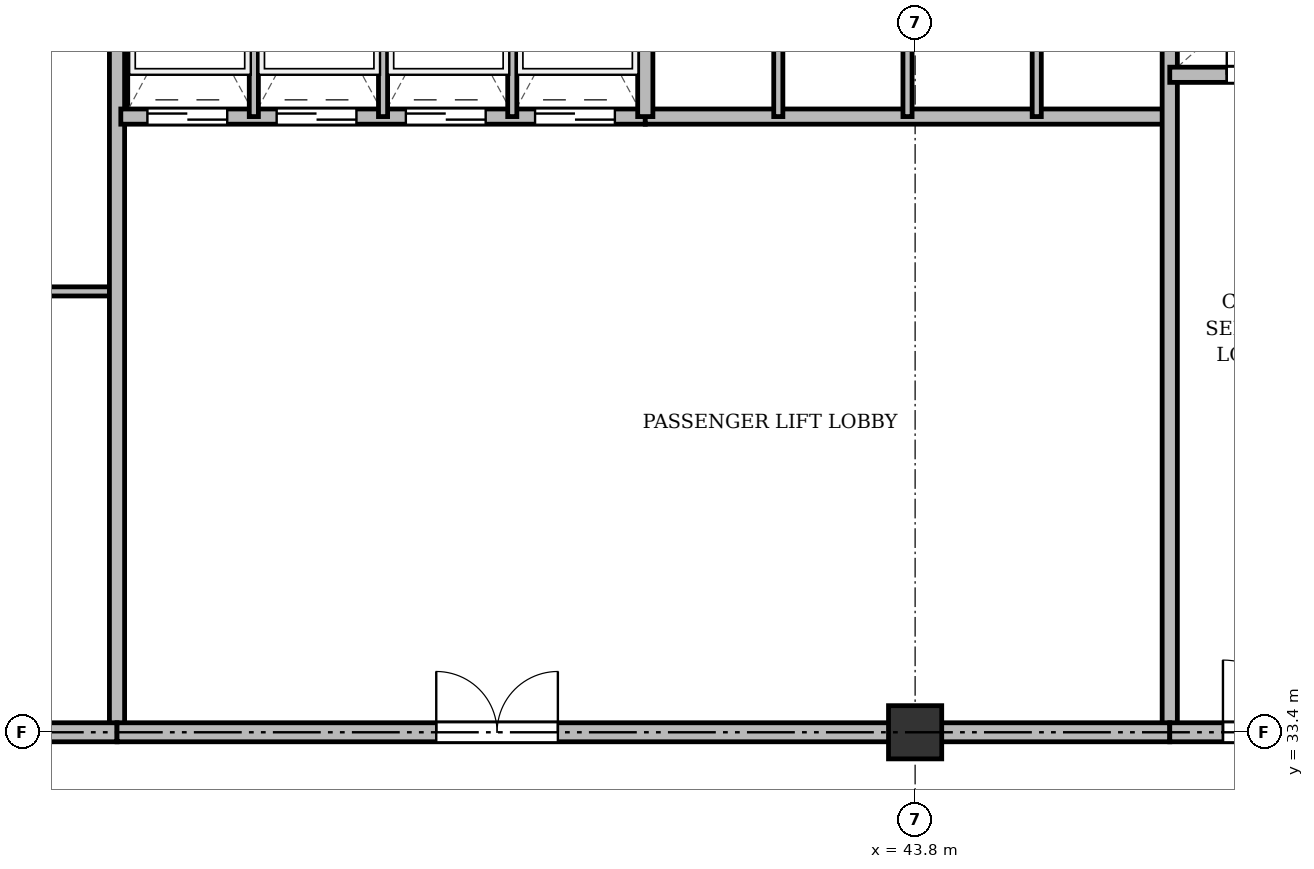
"""IFC4 building model, lengths in metres.
Left out: names, types, materials, properties, quantities, classifications, styles, units other than length and angle.
Written with IfcOpenShell. Run it as: python <this file> out.ifc"""

import sys

from ifc_helpers import new_model, si_unit, direction, frame, frame_2d, origin, origin_2d, place, context, subcontext, project, spatial, rectangle, extrude, source, transform, mapped, element, fill, save


model = new_model("IFC4")
c1 = context("Model", 3, precision=1e-05, world=origin(), true_north=direction((0.0, 1.0)))
c2 = subcontext(c1, "Body", "Model", "MODEL_VIEW")
j1 = project(units=[si_unit("LENGTHUNIT", "METRE"), si_unit("PLANEANGLEUNIT", "RADIAN")], contexts=[c1])
p1 = place(None, origin())
s1 = spatial("IfcSite", under=j1, at=p1, CompositionType="ELEMENT")
p2 = place(p1, origin())
s2 = spatial("IfcBuilding", under=s1, at=p2, CompositionType="ELEMENT")
p3 = place(p2, frame((0.0, 0.0, 157.3)))
s3 = spatial("IfcBuildingStorey", under=s2, at=p3, CompositionType="ELEMENT", Elevation=157.3)
m1 = source(origin(), c2, "Body", "SweptSolid", [
    extrude(rectangle(XDim=0.7, YDim=0.7, at=origin_2d()), origin(), (0.0, 0.0, 1.0), 3.6),
])
p4 = place(p3, frame((43.8, 33.4, 0.0), z_axis=(0.0, 0.0, 1.0), x_axis=(1.0, 0.0, 0.0)))
e1 = element("IfcColumn", 1, at=p4, inside=s3, PredefinedType="COLUMN", context=c2, shape_type="MappedRepresentation", body=[
    mapped(m1, transform((0.0, 0.0, 0.0), x_axis=(1.0, 0.0, 0.0), y_axis=(0.0, 1.0, 0.0), z_axis=(0.0, 0.0, 1.0), scale=1.0)),
])
p5 = place(p3, frame((26.3, 39.2, 0.0), z_axis=(0.0, 0.0, 1.0), x_axis=(1.0, 0.0, 0.0)))
e2 = element("IfcWall", 2, at=p5, inside=s3, PredefinedType="PARTITIONING", context=c2, shape_type="SweptSolid", body=[
    extrude(rectangle(XDim=7.0, YDim=0.12, at=frame_2d((3.5, 0.0))), origin(), (0.0, 0.0, 1.0), 2.85),
])
p6 = place(p5, frame((2.6, 0.0, 0.0)))
e3 = element("IfcOpeningElement", 3, at=p6, cuts=e2, PredefinedType="OPENING", context=c2, shape_type="SweptSolid", body=[
    extrude(rectangle(XDim=0.95, YDim=2.15, at=frame_2d((0.475, 1.075))), frame((0.0, 0.07, 0.0), z_axis=(0.0, -1.0, 0.0), x_axis=(1.0, 0.0, 0.0)), (0.0, 0.0, 1.0), 0.14),
])
p7 = place(p3, frame((33.3, 33.4, 0.0), z_axis=(0.0, 0.0, 1.0), x_axis=(0.0, 1.0, 0.0)))
e4 = element("IfcWall", 4, at=p7, inside=s3, PredefinedType="SOLIDWALL", context=c2, shape_type="SweptSolid", body=[
    extrude(rectangle(XDim=11.3, YDim=0.2, at=frame_2d((5.65, 0.0))), origin(), (0.0, 0.0, 1.0), 2.75),
])
p8 = place(p3, frame((33.35, 41.5, 0.0), z_axis=(0.0, 0.0, 1.0), x_axis=(1.0, 0.0, 0.0)))
e5 = element("IfcWall", 5, at=p8, inside=s3, PredefinedType="SOLIDWALL", context=c2, shape_type="SweptSolid", body=[
    extrude(rectangle(XDim=6.9, YDim=0.2, at=frame_2d((3.45, 0.0))), origin(), (0.0, 0.0, 1.0), 3.35),
])
p9 = place(p8, frame((0.35, 0.0, 0.0)))
e6 = element("IfcOpeningElement", 6, at=p9, cuts=e5, PredefinedType="OPENING", context=c2, shape_type="SweptSolid", body=[
    extrude(rectangle(XDim=1.05, YDim=2.15, at=frame_2d((0.525, 1.075))), frame((0.0, 0.11, 0.0), z_axis=(0.0, -1.0, 0.0), x_axis=(1.0, 0.0, 0.0)), (0.0, 0.0, 1.0), 0.22),
])
p10 = place(p8, frame((2.05, 0.0, 0.0)))
e7 = element("IfcOpeningElement", 7, at=p10, cuts=e5, PredefinedType="OPENING", context=c2, shape_type="SweptSolid", body=[
    extrude(rectangle(XDim=1.05, YDim=2.15, at=frame_2d((0.525, 1.075))), frame((0.0, 0.11, 0.0), z_axis=(0.0, -1.0, 0.0), x_axis=(1.0, 0.0, 0.0)), (0.0, 0.0, 1.0), 0.22),
])
p11 = place(p8, frame((3.75, 0.0, 0.0)))
e8 = element("IfcOpeningElement", 8, at=p11, cuts=e5, PredefinedType="OPENING", context=c2, shape_type="SweptSolid", body=[
    extrude(rectangle(XDim=1.05, YDim=2.15, at=frame_2d((0.525, 1.075))), frame((0.0, 0.11, 0.0), z_axis=(0.0, -1.0, 0.0), x_axis=(1.0, 0.0, 0.0)), (0.0, 0.0, 1.0), 0.22),
])
p12 = place(p8, frame((5.45, 0.0, 0.0)))
e9 = element("IfcOpeningElement", 9, at=p12, cuts=e5, PredefinedType="OPENING", context=c2, shape_type="SweptSolid", body=[
    extrude(rectangle(XDim=1.05, YDim=2.15, at=frame_2d((0.525, 1.075))), frame((0.0, 0.11, 0.0), z_axis=(0.0, -1.0, 0.0), x_axis=(1.0, 0.0, 0.0)), (0.0, 0.0, 1.0), 0.22),
])
for number, where, z_axis, x_axis in (
    (10, (35.1, 41.5, 0.0), (0.0, 0.0, 1.0), (0.0, 1.0, 0.0)),
    (11, (36.8, 41.5, 0.0), (0.0, 0.0, 1.0), (0.0, 1.0, 0.0)),
    (12, (38.5, 41.5, 0.0), (0.0, 0.0, 1.0), (0.0, 1.0, 0.0)),
):
    element("IfcWall", number, at=place(p3, frame(where, z_axis=z_axis, x_axis=x_axis)), inside=s3, PredefinedType="PARTITIONING", context=c2, shape_type="SweptSolid", body=[
        extrude(rectangle(XDim=3.2, YDim=0.12, at=frame_2d((1.6, 0.0))), origin(), (0.0, 0.0, 1.0), 3.35),
    ])
p13 = place(p3, frame((40.25, 41.5, 0.0), z_axis=(0.0, 0.0, 1.0), x_axis=(1.0, 0.0, 0.0)))
e13 = element("IfcWall", 13, at=p13, inside=s3, PredefinedType="SOLIDWALL", context=c2, shape_type="SweptSolid", body=[
    extrude(rectangle(XDim=6.9, YDim=0.2, at=frame_2d((3.45, 0.0))), origin(), (0.0, 0.0, 1.0), 2.85),
])
p14 = place(p3, frame((40.25, 41.5, 0.0), z_axis=(0.0, 0.0, 1.0), x_axis=(0.0, 1.0, 0.0)))
e14 = element("IfcWall", 14, at=p14, inside=s3, PredefinedType="SOLIDWALL", context=c2, shape_type="SweptSolid", body=[
    extrude(rectangle(XDim=3.2, YDim=0.2, at=frame_2d((1.6, 0.0))), origin(), (0.0, 0.0, 1.0), 3.35),
])
p15 = place(p3, frame((42.0, 41.5, 0.0), z_axis=(0.0, 0.0, 1.0), x_axis=(0.0, 1.0, 0.0)))
e15 = element("IfcWall", 15, at=p15, inside=s3, PredefinedType="PARTITIONING", context=c2, shape_type="SweptSolid", body=[
    extrude(rectangle(XDim=3.2, YDim=0.12, at=frame_2d((1.6, 0.0))), origin(), (0.0, 0.0, 1.0), 3.35),
])
p16 = place(p3, frame((43.7, 41.5, 0.0), z_axis=(0.0, 0.0, 1.0), x_axis=(0.0, 1.0, 0.0)))
e16 = element("IfcWall", 16, at=p16, inside=s3, PredefinedType="PARTITIONING", context=c2, shape_type="SweptSolid", body=[
    extrude(rectangle(XDim=3.2, YDim=0.12, at=frame_2d((1.6, 0.0))), origin(), (0.0, 0.0, 1.0), 2.85),
])
p17 = place(p3, frame((45.4, 41.5, 0.0), z_axis=(0.0, 0.0, 1.0), x_axis=(0.0, 1.0, 0.0)))
e17 = element("IfcWall", 17, at=p17, inside=s3, PredefinedType="PARTITIONING", context=c2, shape_type="SweptSolid", body=[
    extrude(rectangle(XDim=3.2, YDim=0.12, at=frame_2d((1.6, 0.0))), origin(), (0.0, 0.0, 1.0), 3.35),
])
p18 = place(p3, frame((47.15, 33.4, 0.0), z_axis=(0.0, 0.0, 1.0), x_axis=(0.0, 1.0, 0.0)))
e18 = element("IfcWall", 18, at=p18, inside=s3, PredefinedType="SOLIDWALL", context=c2, shape_type="SweptSolid", body=[
    extrude(rectangle(XDim=11.3, YDim=0.2, at=frame_2d((5.65, 0.0))), origin(), (0.0, 0.0, 1.0), 2.75),
])
p19 = place(p3, frame((26.3, 33.4, 0.0), z_axis=(0.0, 0.0, 1.0), x_axis=(1.0, 0.0, 0.0)))
e19 = element("IfcWall", 19, at=p19, inside=s3, PredefinedType="PARTITIONING", context=c2, shape_type="SweptSolid", body=[
    extrude(rectangle(XDim=7.0, YDim=0.25, at=frame_2d((3.5, 0.0))), origin(), (0.0, 0.0, 1.0), 2.75),
])
p20 = place(p19, frame((1.35, 0.0, 0.0)))
e20 = element("IfcOpeningElement", 20, at=p20, cuts=e19, PredefinedType="OPENING", context=c2, shape_type="SweptSolid", body=[
    extrude(rectangle(XDim=0.95, YDim=2.15, at=frame_2d((0.475, 1.075))), frame((0.0, 0.135, 0.0), z_axis=(0.0, -1.0, 0.0), x_axis=(1.0, 0.0, 0.0)), (0.0, 0.0, 1.0), 0.27),
])
p21 = place(p3, frame((33.3, 33.4, 0.0), z_axis=(0.0, 0.0, 1.0), x_axis=(1.0, 0.0, 0.0)))
e21 = element("IfcWall", 21, at=p21, inside=s3, PredefinedType="PARTITIONING", context=c2, shape_type="SweptSolid", body=[
    extrude(rectangle(XDim=13.85, YDim=0.25, at=frame_2d((6.925, 0.0))), origin(), (0.0, 0.0, 1.0), 2.75),
])
p22 = place(p21, frame((4.2, 0.0, 0.0)))
e22 = element("IfcOpeningElement", 22, at=p22, cuts=e21, PredefinedType="OPENING", context=c2, shape_type="SweptSolid", body=[
    extrude(rectangle(XDim=1.6, YDim=2.2, at=frame_2d((0.8, 1.1))), frame((0.0, 0.135, 0.0), z_axis=(0.0, -1.0, 0.0), x_axis=(1.0, 0.0, 0.0)), (0.0, 0.0, 1.0), 0.27),
])
p23 = place(p3, frame((47.15, 42.05, 0.0), z_axis=(0.0, 0.0, 1.0), x_axis=(1.0, 0.0, 0.0)))
e23 = element("IfcWall", 23, at=p23, inside=s3, PredefinedType="SOLIDWALL", context=c2, shape_type="SweptSolid", body=[
    extrude(rectangle(XDim=7.85, YDim=0.2, at=frame_2d((3.925, 0.0))), origin(), (0.0, 0.0, 1.0), 2.85),
])
p24 = place(p23, frame((0.75, 0.0, 0.0)))
e24 = element("IfcOpeningElement", 24, at=p24, cuts=e23, PredefinedType="OPENING", context=c2, shape_type="SweptSolid", body=[
    extrude(rectangle(XDim=0.9, YDim=2.1, at=frame_2d((0.45, 1.05))), frame((0.0, 0.11, 0.0), z_axis=(0.0, -1.0, 0.0), x_axis=(1.0, 0.0, 0.0)), (0.0, 0.0, 1.0), 0.22),
])
p25 = place(p23, frame((3.85, 0.0, 0.0)))
e25 = element("IfcOpeningElement", 25, at=p25, cuts=e23, PredefinedType="OPENING", context=c2, shape_type="SweptSolid", body=[
    extrude(rectangle(XDim=0.9, YDim=2.1, at=frame_2d((0.45, 1.05))), frame((0.0, 0.11, 0.0), z_axis=(0.0, -1.0, 0.0), x_axis=(1.0, 0.0, 0.0)), (0.0, 0.0, 1.0), 0.22),
])
p26 = place(p3, frame((47.15, 33.4, 0.0), z_axis=(0.0, 0.0, 1.0), x_axis=(1.0, 0.0, 0.0)))
e26 = element("IfcWall", 26, at=p26, inside=s3, PredefinedType="PARTITIONING", context=c2, shape_type="SweptSolid", body=[
    extrude(rectangle(XDim=11.15, YDim=0.25, at=frame_2d((5.575, 0.0))), origin(), (0.0, 0.0, 1.0), 2.75),
])
p27 = place(p26, frame((0.7, 0.0, 0.0)))
e27 = element("IfcOpeningElement", 27, at=p27, cuts=e26, PredefinedType="OPENING", context=c2, shape_type="SweptSolid", body=[
    extrude(rectangle(XDim=0.95, YDim=2.15, at=frame_2d((0.475, 1.075))), frame((0.0, 0.135, 0.0), z_axis=(0.0, -1.0, 0.0), x_axis=(1.0, 0.0, 0.0)), (0.0, 0.0, 1.0), 0.27),
])
p28 = place(p26, frame((6.0, 0.0, 0.0)))
e28 = element("IfcOpeningElement", 28, at=p28, cuts=e26, PredefinedType="OPENING", context=c2, shape_type="SweptSolid", body=[
    extrude(rectangle(XDim=1.2, YDim=2.15, at=frame_2d((0.6, 1.075))), frame((0.0, 0.135, 0.0), z_axis=(0.0, -1.0, 0.0), x_axis=(1.0, 0.0, 0.0)), (0.0, 0.0, 1.0), 0.27),
])
m2 = source(origin(), c2, "Body", "SweptSolid", [
    extrude(rectangle(XDim=1.05, YDim=2.15, at=frame_2d((0.525, 1.075))), frame((0.0, 0.025, 0.0), z_axis=(0.0, -1.0, 0.0), x_axis=(1.0, 0.0, 0.0)), (0.0, 0.0, 1.0), 0.05),
])
p29 = place(p9, origin())
e29 = element("IfcDoor", 29, at=p29, inside=s3, OperationType="DOUBLE_DOOR_SLIDING", PredefinedType="DOOR", context=c2, shape_type="MappedRepresentation", body=[
    mapped(m2, transform((0.0, 0.0, 0.0), x_axis=(1.0, 0.0, 0.0), y_axis=(0.0, 1.0, 0.0), z_axis=(0.0, 0.0, 1.0), scale=1.0)),
])
fill(e6, e29)
p30 = place(p10, origin())
e30 = element("IfcDoor", 30, at=p30, inside=s3, OperationType="DOUBLE_DOOR_SLIDING", PredefinedType="DOOR", context=c2, shape_type="MappedRepresentation", body=[
    mapped(m2, transform((0.0, 0.0, 0.0), x_axis=(1.0, 0.0, 0.0), y_axis=(0.0, 1.0, 0.0), z_axis=(0.0, 0.0, 1.0), scale=1.0)),
])
fill(e7, e30)
p31 = place(p11, origin())
e31 = element("IfcDoor", 31, at=p31, inside=s3, OperationType="DOUBLE_DOOR_SLIDING", PredefinedType="DOOR", context=c2, shape_type="MappedRepresentation", body=[
    mapped(m2, transform((0.0, 0.0, 0.0), x_axis=(1.0, 0.0, 0.0), y_axis=(0.0, 1.0, 0.0), z_axis=(0.0, 0.0, 1.0), scale=1.0)),
])
fill(e8, e31)
p32 = place(p12, origin())
e32 = element("IfcDoor", 32, at=p32, inside=s3, OperationType="DOUBLE_DOOR_SLIDING", PredefinedType="DOOR", context=c2, shape_type="MappedRepresentation", body=[
    mapped(m2, transform((0.0, 0.0, 0.0), x_axis=(1.0, 0.0, 0.0), y_axis=(0.0, 1.0, 0.0), z_axis=(0.0, 0.0, 1.0), scale=1.0)),
])
fill(e9, e32)
m3 = source(origin(), c2, "Body", "SweptSolid", [
    extrude(rectangle(XDim=1.6, YDim=2.2, at=frame_2d((0.8, 1.1))), frame((0.0, 0.025, 0.0), z_axis=(0.0, -1.0, 0.0), x_axis=(1.0, 0.0, 0.0)), (0.0, 0.0, 1.0), 0.05),
])
p33 = place(p22, origin())
e33 = element("IfcDoor", 33, at=p33, inside=s3, OperationType="DOUBLE_DOOR_SINGLE_SWING", PredefinedType="DOOR", context=c2, shape_type="MappedRepresentation", body=[
    mapped(m3, transform((0.0, 0.0, 0.0), x_axis=(1.0, 0.0, 0.0), y_axis=(0.0, 1.0, 0.0), z_axis=(0.0, 0.0, 1.0), scale=1.0)),
])
fill(e22, e33)
m4 = source(origin(), c2, "Body", "SweptSolid", [
    extrude(rectangle(XDim=0.9, YDim=2.1, at=frame_2d((0.45, 1.05))), frame((0.0, 0.025, 0.0), z_axis=(0.0, -1.0, 0.0), x_axis=(1.0, 0.0, 0.0)), (0.0, 0.0, 1.0), 0.05),
])
p34 = place(p24, origin())
e34 = element("IfcDoor", 34, at=p34, inside=s3, OperationType="SINGLE_SWING_LEFT", PredefinedType="DOOR", context=c2, shape_type="MappedRepresentation", body=[
    mapped(m4, transform((0.0, 0.0, 0.0), x_axis=(1.0, 0.0, 0.0), y_axis=(0.0, 1.0, 0.0), z_axis=(0.0, 0.0, 1.0), scale=1.0)),
])
fill(e24, e34)
m5 = source(origin(), c2, "Body", "SweptSolid", [
    extrude(rectangle(XDim=0.95, YDim=2.15, at=frame_2d((0.475, 1.075))), frame((0.0, 0.025, 0.0), z_axis=(0.0, -1.0, 0.0), x_axis=(1.0, 0.0, 0.0)), (0.0, 0.0, 1.0), 0.05),
])
p35 = place(p27, origin())
e35 = element("IfcDoor", 35, at=p35, inside=s3, OperationType="SINGLE_SWING_LEFT", PredefinedType="DOOR", context=c2, shape_type="MappedRepresentation", body=[
    mapped(m5, transform((0.0, 0.0, 0.0), x_axis=(1.0, 0.0, 0.0), y_axis=(0.0, 1.0, 0.0), z_axis=(0.0, 0.0, 1.0), scale=1.0)),
])
fill(e27, e35)
save(model, sys.argv[1])
